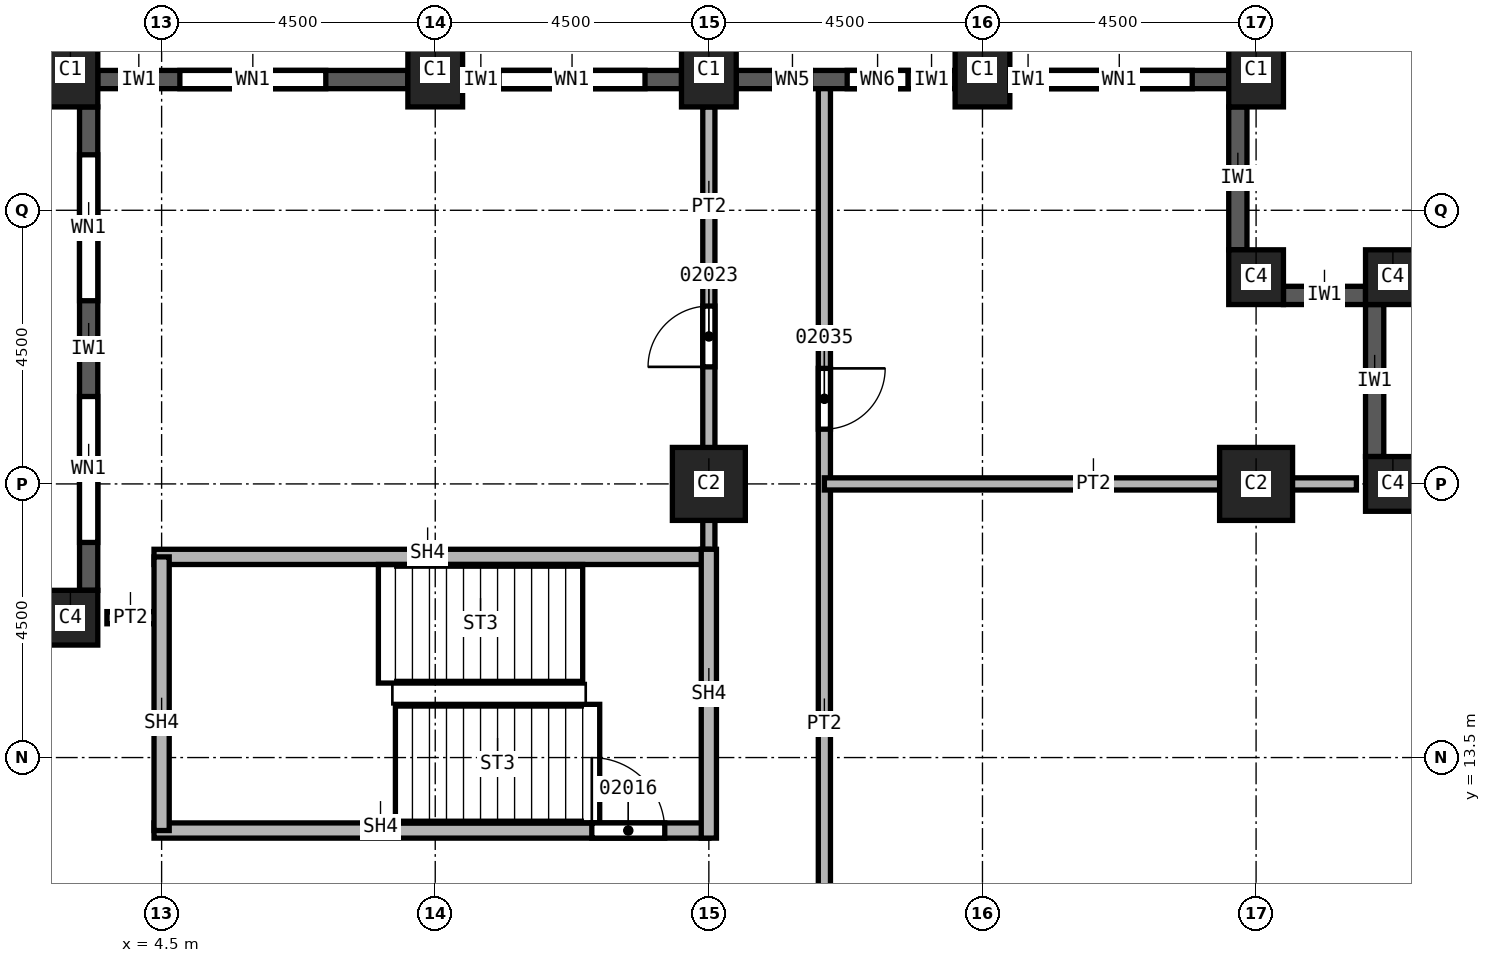
"""IFC4 building model, lengths in metres.
Left out: names, types, materials, properties, quantities, classifications, styles, units other than length and angle.
Written with IfcOpenShell. Run it as: python <this file> out.ifc"""

import sys

from ifc_helpers import new_model, si_unit, direction, frame, frame_2d, origin, origin_2d, place, context, subcontext, project, spatial, rectangle, extrude, element, fill, save


model = new_model("IFC4")
c1 = context("Model", 3, precision=1e-05, world=origin(), true_north=direction((0.0, 1.0)))
c2 = subcontext(c1, "Body", "Model", "MODEL_VIEW")
j1 = project(units=[si_unit("LENGTHUNIT", "METRE"), si_unit("PLANEANGLEUNIT", "RADIAN")], contexts=[c1])
p1 = place(None, origin())
s1 = spatial("IfcSite", under=j1, at=p1, CompositionType="ELEMENT")
p2 = place(p1, origin())
s2 = spatial("IfcBuilding", under=s1, at=p2, CompositionType="ELEMENT")
p3 = place(p2, frame((0.0, 0.0, 80.0)))
s3 = spatial("IfcBuildingStorey", under=s2, at=p3, CompositionType="ELEMENT", Elevation=80.0)
for number, where, z_axis, x_axis in (
    (1, (13.5, 18.0, 0.0), (0.0, 0.0, 1.0), (1.0, 0.0, 0.0)),
    (2, (22.5, 18.0, 0.0), (0.0, 0.0, 1.0), (1.0, 0.0, 0.0)),
):
    element("IfcColumn", number, at=place(p3, frame(where, z_axis=z_axis, x_axis=x_axis)), inside=s3, PredefinedType="COLUMN", context=c2, shape_type="SweptSolid", body=[
        extrude(rectangle(XDim=1.2, YDim=1.2, at=origin_2d()), origin(), (0.0, 0.0, 1.0), 3.7),
    ])
for number, where, z_axis, x_axis in (
    (3, (3.0, 24.8, 0.0), (0.0, 0.0, 1.0), (1.0, 0.0, 0.0)),
    (4, (9.0, 24.8, 0.0), (0.0, 0.0, 1.0), (1.0, 0.0, 0.0)),
    (5, (13.5, 24.8, 0.0), (0.0, 0.0, 1.0), (1.0, 0.0, 0.0)),
    (6, (18.0, 24.8, 0.0), (0.0, 0.0, 1.0), (1.0, 0.0, 0.0)),
    (7, (22.5, 24.8, 0.0), (0.0, 0.0, 1.0), (1.0, 0.0, 0.0)),
):
    element("IfcColumn", number, at=place(p3, frame(where, z_axis=z_axis, x_axis=x_axis)), inside=s3, PredefinedType="COLUMN", context=c2, shape_type="SweptSolid", body=[
        extrude(rectangle(XDim=0.9, YDim=1.2, at=origin_2d()), origin(), (0.0, 0.0, 1.0), 3.7),
    ])
for number, where, z_axis, x_axis in (
    (8, (3.0, 15.8, 0.0), (0.0, 0.0, 1.0), (1.0, 0.0, 0.0)),
    (9, (22.5, 21.4, 0.0), (0.0, 0.0, 1.0), (1.0, 0.0, 0.0)),
    (10, (24.75, 21.4, 0.0), (0.0, 0.0, 1.0), (1.0, 0.0, 0.0)),
    (11, (24.75, 18.0, 0.0), (0.0, 0.0, 1.0), (1.0, 0.0, 0.0)),
):
    element("IfcColumn", number, at=place(p3, frame(where, z_axis=z_axis, x_axis=x_axis)), inside=s3, PredefinedType="COLUMN", context=c2, shape_type="SweptSolid", body=[
        extrude(rectangle(XDim=0.9, YDim=0.9, at=origin_2d()), origin(), (0.0, 0.0, 1.0), 3.7),
    ])
p4 = place(p3, frame((24.45, 18.45, 0.0), z_axis=(0.0, 0.0, 1.0), x_axis=(0.0, 1.0, 0.0)))
e12 = element("IfcWall", 12, at=p4, inside=s3, PredefinedType="SOLIDWALL", context=c2, shape_type="SweptSolid", body=[
    extrude(rectangle(XDim=2.5, YDim=0.3, at=frame_2d((1.25, 0.0))), origin(), (0.0, 0.0, 1.0), 3.1),
])
p5 = place(p3, frame((24.3, 21.1, 0.0), z_axis=(0.0, 0.0, 1.0), x_axis=(-1.0, 0.0, 0.0)))
e13 = element("IfcWall", 13, at=p5, inside=s3, PredefinedType="SOLIDWALL", context=c2, shape_type="SweptSolid", body=[
    extrude(rectangle(XDim=1.35, YDim=0.3, at=frame_2d((0.675, 0.0))), origin(), (0.0, 0.0, 1.0), 3.1),
])
p6 = place(p3, frame((22.2, 21.85, 0.0), z_axis=(0.0, 0.0, 1.0), x_axis=(0.0, 1.0, 0.0)))
e14 = element("IfcWall", 14, at=p6, inside=s3, PredefinedType="SOLIDWALL", context=c2, shape_type="SweptSolid", body=[
    extrude(rectangle(XDim=2.35, YDim=0.3, at=frame_2d((1.175, 0.0))), origin(), (0.0, 0.0, 1.0), 3.1),
])
p7 = place(p3, frame((22.05, 24.65, 0.0), z_axis=(0.0, 0.0, 1.0), x_axis=(-1.0, 0.0, 0.0)))
e15 = element("IfcWall", 15, at=p7, inside=s3, PredefinedType="SOLIDWALL", context=c2, shape_type="SweptSolid", body=[
    extrude(rectangle(XDim=3.6, YDim=0.3, at=frame_2d((1.8, 0.0))), origin(), (0.0, 0.0, 1.0), 3.1),
])
p8 = place(p7, frame((0.6, 0.0, 0.8)))
e16 = element("IfcOpeningElement", 16, at=p8, cuts=e15, PredefinedType="OPENING", context=c2, shape_type="SweptSolid", body=[
    extrude(rectangle(XDim=2.4, YDim=1.95, at=frame_2d((1.2, 0.975))), frame((0.0, 0.15, 0.0), z_axis=(0.0, -1.0, 0.0), x_axis=(1.0, 0.0, 0.0)), (0.0, 0.0, 1.0), 0.3),
])
p9 = place(p3, frame((17.55, 24.65, 0.0), z_axis=(0.0, 0.0, 1.0), x_axis=(-1.0, 0.0, 0.0)))
e17 = element("IfcWall", 17, at=p9, inside=s3, PredefinedType="SOLIDWALL", context=c2, shape_type="SweptSolid", body=[
    extrude(rectangle(XDim=3.6, YDim=0.3, at=frame_2d((1.8, 0.0))), origin(), (0.0, 0.0, 1.0), 3.1),
])
p10 = place(p9, frame((0.775, 0.0, 0.8)))
e18 = element("IfcOpeningElement", 18, at=p10, cuts=e17, PredefinedType="OPENING", context=c2, shape_type="SweptSolid", body=[
    extrude(rectangle(XDim=1.0, YDim=1.95, at=frame_2d((0.5, 0.975))), frame((0.0, 0.15, 0.0), z_axis=(0.0, -1.0, 0.0), x_axis=(1.0, 0.0, 0.0)), (0.0, 0.0, 1.0), 0.3),
])
p11 = place(p9, frame((2.375, 0.0, 0.8)))
e19 = element("IfcOpeningElement", 19, at=p11, cuts=e17, PredefinedType="OPENING", context=c2, shape_type="SweptSolid", body=[
    extrude(rectangle(XDim=0.6, YDim=1.95, at=frame_2d((0.3, 0.975))), frame((0.0, 0.15, 0.0), z_axis=(0.0, -1.0, 0.0), x_axis=(1.0, 0.0, 0.0)), (0.0, 0.0, 1.0), 0.3),
])
p12 = place(p3, frame((13.05, 24.65, 0.0), z_axis=(0.0, 0.0, 1.0), x_axis=(-1.0, 0.0, 0.0)))
e20 = element("IfcWall", 20, at=p12, inside=s3, PredefinedType="SOLIDWALL", context=c2, shape_type="SweptSolid", body=[
    extrude(rectangle(XDim=3.6, YDim=0.3, at=frame_2d((1.8, 0.0))), origin(), (0.0, 0.0, 1.0), 3.1),
])
p13 = place(p12, frame((0.6, 0.0, 0.8)))
e21 = element("IfcOpeningElement", 21, at=p13, cuts=e20, PredefinedType="OPENING", context=c2, shape_type="SweptSolid", body=[
    extrude(rectangle(XDim=2.4, YDim=1.95, at=frame_2d((1.2, 0.975))), frame((0.0, 0.15, 0.0), z_axis=(0.0, -1.0, 0.0), x_axis=(1.0, 0.0, 0.0)), (0.0, 0.0, 1.0), 0.3),
])
p14 = place(p3, frame((8.55, 24.65, 0.0), z_axis=(0.0, 0.0, 1.0), x_axis=(-1.0, 0.0, 0.0)))
e22 = element("IfcWall", 22, at=p14, inside=s3, PredefinedType="SOLIDWALL", context=c2, shape_type="SweptSolid", body=[
    extrude(rectangle(XDim=5.1, YDim=0.3, at=frame_2d((2.55, 0.0))), origin(), (0.0, 0.0, 1.0), 3.1),
])
p15 = place(p14, frame((1.35, 0.0, 0.8)))
e23 = element("IfcOpeningElement", 23, at=p15, cuts=e22, PredefinedType="OPENING", context=c2, shape_type="SweptSolid", body=[
    extrude(rectangle(XDim=2.4, YDim=1.95, at=frame_2d((1.2, 0.975))), frame((0.0, 0.15, 0.0), z_axis=(0.0, -1.0, 0.0), x_axis=(1.0, 0.0, 0.0)), (0.0, 0.0, 1.0), 0.3),
])
p16 = place(p3, frame((3.3, 24.2, 0.0), z_axis=(0.0, 0.0, 1.0), x_axis=(0.0, -1.0, 0.0)))
e24 = element("IfcWall", 24, at=p16, inside=s3, PredefinedType="SOLIDWALL", context=c2, shape_type="SweptSolid", body=[
    extrude(rectangle(XDim=7.95, YDim=0.3, at=frame_2d((3.975, 0.0))), origin(), (0.0, 0.0, 1.0), 3.1),
])
p17 = place(p16, frame((0.788, 0.0, 0.8)))
e25 = element("IfcOpeningElement", 25, at=p17, cuts=e24, PredefinedType="OPENING", context=c2, shape_type="SweptSolid", body=[
    extrude(rectangle(XDim=2.4, YDim=1.95, at=frame_2d((1.2, 0.975))), frame((0.0, 0.15, 0.0), z_axis=(0.0, -1.0, 0.0), x_axis=(1.0, 0.0, 0.0)), (0.0, 0.0, 1.0), 0.3),
])
p18 = place(p16, frame((4.762, 0.0, 0.8)))
e26 = element("IfcOpeningElement", 26, at=p18, cuts=e24, PredefinedType="OPENING", context=c2, shape_type="SweptSolid", body=[
    extrude(rectangle(XDim=2.4, YDim=1.95, at=frame_2d((1.2, 0.975))), frame((0.0, 0.15, 0.0), z_axis=(0.0, -1.0, 0.0), x_axis=(1.0, 0.0, 0.0)), (0.0, 0.0, 1.0), 0.3),
])
p19 = place(p3, frame((3.6, 15.8, 0.0), z_axis=(0.0, 0.0, 1.0), x_axis=(1.0, 0.0, 0.0)))
e27 = element("IfcWall", 27, at=p19, inside=s3, PredefinedType="PARTITIONING", context=c2, shape_type="SweptSolid", body=[
    extrude(rectangle(XDim=0.9, YDim=0.2, at=frame_2d((0.45, 0.0))), origin(), (0.0, 0.0, 1.0), 3.7),
])
p20 = place(p3, frame((13.5, 16.675, 0.0), z_axis=(0.0, 0.0, 1.0), x_axis=(0.0, 1.0, 0.0)))
e28 = element("IfcWall", 28, at=p20, inside=s3, PredefinedType="PARTITIONING", context=c2, shape_type="SweptSolid", body=[
    extrude(rectangle(XDim=7.525, YDim=0.2, at=frame_2d((3.762, 0.0))), origin(), (0.0, 0.0, 1.0), 3.7),
])
p21 = place(p20, frame((3.25, 0.0, 0.0)))
e29 = element("IfcOpeningElement", 29, at=p21, cuts=e28, PredefinedType="OPENING", context=c2, shape_type="SweptSolid", body=[
    extrude(rectangle(XDim=1.0, YDim=2.1, at=frame_2d((0.5, 1.05))), frame((0.0, 0.1, 0.0), z_axis=(0.0, -1.0, 0.0), x_axis=(1.0, 0.0, 0.0)), (0.0, 0.0, 1.0), 0.2),
])
p22 = place(p3, frame((15.4, 24.5, 0.0), z_axis=(0.0, 0.0, 1.0), x_axis=(0.0, -1.0, 0.0)))
e30 = element("IfcWall", 30, at=p22, inside=s3, PredefinedType="PARTITIONING", context=c2, shape_type="SweptSolid", body=[
    extrude(rectangle(XDim=25.35, YDim=0.2, at=frame_2d((12.675, 0.0))), origin(), (0.0, 0.0, 1.0), 3.7),
])
p23 = place(p22, frame((17.9, 0.0, 0.0)))
e31 = element("IfcOpeningElement", 31, at=p23, cuts=e30, PredefinedType="OPENING", context=c2, shape_type="SweptSolid", body=[
    extrude(rectangle(XDim=1.0, YDim=2.1, at=frame_2d((0.5, 1.05))), frame((0.0, 0.1, 0.0), z_axis=(0.0, -1.0, 0.0), x_axis=(1.0, 0.0, 0.0)), (0.0, 0.0, 1.0), 0.2),
])
p24 = place(p22, frame((14.3, 0.0, 0.0)))
e32 = element("IfcOpeningElement", 32, at=p24, cuts=e30, PredefinedType="OPENING", context=c2, shape_type="SweptSolid", body=[
    extrude(rectangle(XDim=1.0, YDim=2.1, at=frame_2d((0.5, 1.05))), frame((0.0, 0.1, 0.0), z_axis=(0.0, -1.0, 0.0), x_axis=(1.0, 0.0, 0.0)), (0.0, 0.0, 1.0), 0.2),
])
p25 = place(p22, frame((4.6, 0.0, 0.0)))
e33 = element("IfcOpeningElement", 33, at=p25, cuts=e30, PredefinedType="OPENING", context=c2, shape_type="SweptSolid", body=[
    extrude(rectangle(XDim=1.0, YDim=2.1, at=frame_2d((0.5, 1.05))), frame((0.0, 0.1, 0.0), z_axis=(0.0, -1.0, 0.0), x_axis=(1.0, 0.0, 0.0)), (0.0, 0.0, 1.0), 0.2),
])
p26 = place(p3, frame((15.4, 18.0, 0.0), z_axis=(0.0, 0.0, 1.0), x_axis=(1.0, 0.0, 0.0)))
e34 = element("IfcWall", 34, at=p26, inside=s3, PredefinedType="PARTITIONING", context=c2, shape_type="SweptSolid", body=[
    extrude(rectangle(XDim=8.75, YDim=0.2, at=frame_2d((4.375, 0.0))), origin(), (0.0, 0.0, 1.0), 3.7),
])
p27 = place(p3, frame((4.375, 12.3, 0.0), z_axis=(0.0, 0.0, 1.0), x_axis=(1.0, 0.0, 0.0)))
e35 = element("IfcWall", 35, at=p27, inside=s3, PredefinedType="SOLIDWALL", context=c2, shape_type="SweptSolid", body=[
    extrude(rectangle(XDim=9.125, YDim=0.25, at=frame_2d((4.562, 0.0))), origin(), (0.0, 0.0, 1.0), 3.7),
])
p28 = place(p27, frame((7.2, 0.0, 0.0)))
e36 = element("IfcOpeningElement", 36, at=p28, cuts=e35, PredefinedType="OPENING", context=c2, shape_type="SweptSolid", body=[
    extrude(rectangle(XDim=1.2, YDim=2.1, at=frame_2d((0.6, 1.05))), frame((0.0, 0.125, 0.0), z_axis=(0.0, -1.0, 0.0), x_axis=(1.0, 0.0, 0.0)), (0.0, 0.0, 1.0), 0.25),
])
p29 = place(p3, frame((4.375, 16.8, 0.0), z_axis=(0.0, 0.0, 1.0), x_axis=(1.0, 0.0, 0.0)))
e37 = element("IfcWall", 37, at=p29, inside=s3, PredefinedType="SOLIDWALL", context=c2, shape_type="SweptSolid", body=[
    extrude(rectangle(XDim=9.125, YDim=0.25, at=frame_2d((4.562, 0.0))), origin(), (0.0, 0.0, 1.0), 3.7),
])
p30 = place(p3, frame((4.5, 12.3, 0.0), z_axis=(0.0, 0.0, 1.0), x_axis=(0.0, 1.0, 0.0)))
e38 = element("IfcWall", 38, at=p30, inside=s3, PredefinedType="SOLIDWALL", context=c2, shape_type="SweptSolid", body=[
    extrude(rectangle(XDim=4.5, YDim=0.25, at=frame_2d((2.25, 0.0))), origin(), (0.0, 0.0, 1.0), 3.7),
])
p31 = place(p3, frame((13.5, 12.175, 0.0), z_axis=(0.0, 0.0, 1.0), x_axis=(0.0, 1.0, 0.0)))
e39 = element("IfcWall", 39, at=p31, inside=s3, PredefinedType="SOLIDWALL", context=c2, shape_type="SweptSolid", body=[
    extrude(rectangle(XDim=4.75, YDim=0.25, at=frame_2d((2.375, 0.0))), origin(), (0.0, 0.0, 1.0), 3.7),
])
p32 = place(p8, origin())
e40 = element("IfcWindow", 40, at=p32, inside=s3, PartitioningType="SINGLE_PANEL", PredefinedType="WINDOW", context=c2, shape_type="SweptSolid", body=[
    extrude(rectangle(XDim=2.4, YDim=1.95, at=frame_2d((1.2, 0.975))), frame((0.0, 0.03, 0.0), z_axis=(0.0, -1.0, 0.0), x_axis=(1.0, 0.0, 0.0)), (0.0, 0.0, 1.0), 0.06),
])
fill(e16, e40)
p33 = place(p13, origin())
e41 = element("IfcWindow", 41, at=p33, inside=s3, PartitioningType="SINGLE_PANEL", PredefinedType="WINDOW", context=c2, shape_type="SweptSolid", body=[
    extrude(rectangle(XDim=2.4, YDim=1.95, at=frame_2d((1.2, 0.975))), frame((0.0, 0.03, 0.0), z_axis=(0.0, -1.0, 0.0), x_axis=(1.0, 0.0, 0.0)), (0.0, 0.0, 1.0), 0.06),
])
fill(e21, e41)
p34 = place(p15, origin())
e42 = element("IfcWindow", 42, at=p34, inside=s3, PartitioningType="SINGLE_PANEL", PredefinedType="WINDOW", context=c2, shape_type="SweptSolid", body=[
    extrude(rectangle(XDim=2.4, YDim=1.95, at=frame_2d((1.2, 0.975))), frame((0.0, 0.03, 0.0), z_axis=(0.0, -1.0, 0.0), x_axis=(1.0, 0.0, 0.0)), (0.0, 0.0, 1.0), 0.06),
])
fill(e23, e42)
p35 = place(p17, origin())
e43 = element("IfcWindow", 43, at=p35, inside=s3, PartitioningType="SINGLE_PANEL", PredefinedType="WINDOW", context=c2, shape_type="SweptSolid", body=[
    extrude(rectangle(XDim=2.4, YDim=1.95, at=frame_2d((1.2, 0.975))), frame((0.0, 0.03, 0.0), z_axis=(0.0, -1.0, 0.0), x_axis=(1.0, 0.0, 0.0)), (0.0, 0.0, 1.0), 0.06),
])
fill(e25, e43)
p36 = place(p18, origin())
e44 = element("IfcWindow", 44, at=p36, inside=s3, PartitioningType="SINGLE_PANEL", PredefinedType="WINDOW", context=c2, shape_type="SweptSolid", body=[
    extrude(rectangle(XDim=2.4, YDim=1.95, at=frame_2d((1.2, 0.975))), frame((0.0, 0.03, 0.0), z_axis=(0.0, -1.0, 0.0), x_axis=(1.0, 0.0, 0.0)), (0.0, 0.0, 1.0), 0.06),
])
fill(e26, e44)
p37 = place(p28, origin())
e45 = element("IfcDoor", 45, at=p37, inside=s3, OperationType="SINGLE_SWING_LEFT", PredefinedType="DOOR", context=c2, shape_type="SweptSolid", body=[
    extrude(rectangle(XDim=1.2, YDim=2.1, at=frame_2d((0.6, 1.05))), frame((0.0, 0.025, 0.0), z_axis=(0.0, -1.0, 0.0), x_axis=(1.0, 0.0, 0.0)), (0.0, 0.0, 1.0), 0.05),
])
fill(e36, e45)
p38 = place(p21, origin())
e46 = element("IfcDoor", 46, at=p38, inside=s3, OperationType="SINGLE_SWING_RIGHT", PredefinedType="DOOR", context=c2, shape_type="SweptSolid", body=[
    extrude(rectangle(XDim=1.0, YDim=2.1, at=frame_2d((0.5, 1.05))), frame((0.0, 0.025, 0.0), z_axis=(0.0, -1.0, 0.0), x_axis=(1.0, 0.0, 0.0)), (0.0, 0.0, 1.0), 0.05),
])
fill(e29, e46)
p39 = place(p25, origin())
e47 = element("IfcDoor", 47, at=p39, inside=s3, OperationType="SINGLE_SWING_RIGHT", PredefinedType="DOOR", context=c2, shape_type="SweptSolid", body=[
    extrude(rectangle(XDim=1.0, YDim=2.1, at=frame_2d((0.5, 1.05))), frame((0.0, 0.025, 0.0), z_axis=(0.0, -1.0, 0.0), x_axis=(1.0, 0.0, 0.0)), (0.0, 0.0, 1.0), 0.05),
])
fill(e33, e47)
p40 = place(p10, origin())
e48 = element("IfcWindow", 48, at=p40, inside=s3, PartitioningType="SINGLE_PANEL", PredefinedType="WINDOW", context=c2, shape_type="SweptSolid", body=[
    extrude(rectangle(XDim=1.0, YDim=1.95, at=frame_2d((0.5, 0.975))), frame((0.0, 0.03, 0.0), z_axis=(0.0, -1.0, 0.0), x_axis=(1.0, 0.0, 0.0)), (0.0, 0.0, 1.0), 0.06),
])
fill(e18, e48)
p41 = place(p11, origin())
e49 = element("IfcWindow", 49, at=p41, inside=s3, PartitioningType="SINGLE_PANEL", PredefinedType="WINDOW", context=c2, shape_type="SweptSolid", body=[
    extrude(rectangle(XDim=0.6, YDim=1.95, at=frame_2d((0.3, 0.975))), frame((0.0, 0.03, 0.0), z_axis=(0.0, -1.0, 0.0), x_axis=(1.0, 0.0, 0.0)), (0.0, 0.0, 1.0), 0.06),
])
fill(e19, e49)
save(model, sys.argv[1])
